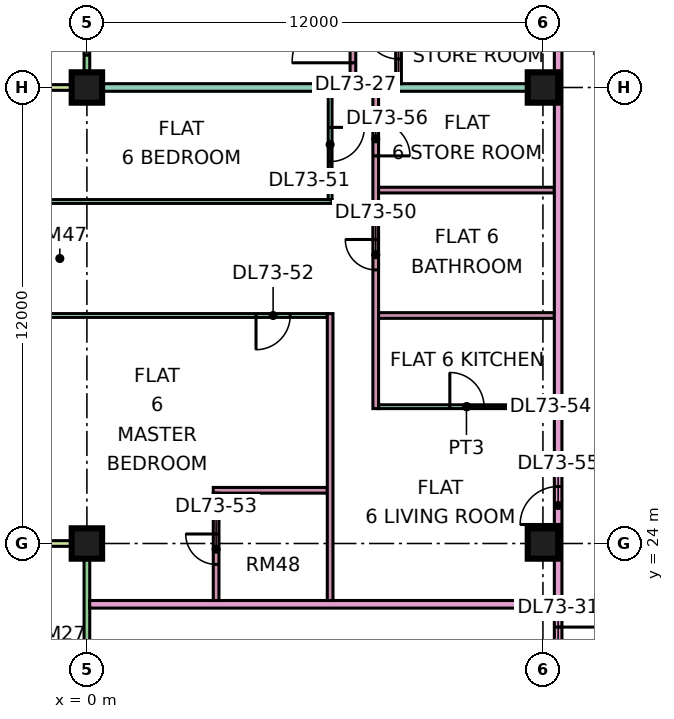
"""IFC4 building model, lengths in metres.
Left out: names, types, materials, properties, quantities, classifications, styles, units other than length and angle.
Written with IfcOpenShell. Run it as: python <this file> out.ifc"""

import sys

from ifc_helpers import new_model, si_unit, direction, frame, frame_2d, origin, origin_2d, place, context, subcontext, project, spatial, rectangle, extrude, element, fill, save


model = new_model("IFC4")
c1 = context("Model", 3, precision=1e-05, world=origin(), true_north=direction((0.0, 1.0)))
c2 = subcontext(c1, "Body", "Model", "MODEL_VIEW")
j1 = project(units=[si_unit("LENGTHUNIT", "METRE"), si_unit("PLANEANGLEUNIT", "RADIAN")], contexts=[c1])
p1 = place(None, origin())
s1 = spatial("IfcSite", under=j1, at=p1, CompositionType="ELEMENT")
p2 = place(p1, origin())
s2 = spatial("IfcBuilding", under=s1, at=p2, CompositionType="ELEMENT")
p3 = place(p2, frame((0.0, 0.0, 310.9)))
s3 = spatial("IfcBuildingStorey", under=s2, at=p3, CompositionType="ELEMENT", Elevation=310.9)
p4 = place(p3, frame((0.0, 24.0, 0.0), z_axis=(0.0, 0.0, 1.0), x_axis=(1.0, 0.0, 0.0)))
e1 = element("IfcColumn", 1, at=p4, inside=s3, PredefinedType="COLUMN", context=c2, shape_type="SweptSolid", body=[
    extrude(rectangle(XDim=0.8, YDim=0.8, at=origin_2d()), origin(), (0.0, 0.0, 1.0), 3.75),
])
p5 = place(p3, frame((0.0, 36.0, 0.0), z_axis=(0.0, 0.0, 1.0), x_axis=(1.0, 0.0, 0.0)))
e2 = element("IfcColumn", 2, at=p5, inside=s3, PredefinedType="COLUMN", context=c2, shape_type="SweptSolid", body=[
    extrude(rectangle(XDim=0.8, YDim=0.8, at=origin_2d()), origin(), (0.0, 0.0, 1.0), 3.75),
])
for number, where, z_axis, x_axis in (
    (3, (12.0, 24.0, 0.0), (0.0, 0.0, 1.0), (1.0, 0.0, 0.0)),
    (4, (12.0, 36.0, 0.0), (0.0, 0.0, 1.0), (1.0, 0.0, 0.0)),
):
    element("IfcColumn", number, at=place(p3, frame(where, z_axis=z_axis, x_axis=x_axis)), inside=s3, PredefinedType="COLUMN", context=c2, shape_type="SweptSolid", body=[
        extrude(rectangle(XDim=0.8, YDim=0.8, at=origin_2d()), origin(), (0.0, 0.0, 1.0), 3.75),
    ])
p6 = place(p3, frame((0.0, 47.925, 0.0), z_axis=(0.0, 0.0, 1.0), x_axis=(0.0, -1.0, 0.0)))
e5 = element("IfcWall", 5, at=p6, inside=s3, PredefinedType="SOLIDWALL", context=c2, shape_type="SweptSolid", body=[
    extrude(rectangle(XDim=11.85, YDim=0.15, at=frame_2d((5.925, 0.0))), origin(), (0.0, 0.0, 1.0), 3.35),
])
p7 = place(p6, frame((0.613, 0.0, 0.0)))
e6 = element("IfcOpeningElement", 6, at=p7, cuts=e5, PredefinedType="OPENING", context=c2, shape_type="SweptSolid", body=[
    extrude(rectangle(XDim=1.2, YDim=2.4, at=frame_2d((0.6, 1.2))), frame((0.0, 0.085, 0.0), z_axis=(0.0, -1.0, 0.0), x_axis=(1.0, 0.0, 0.0)), (0.0, 0.0, 1.0), 0.17),
])
p8 = place(p6, frame((4.675, 0.0, 0.45)))
e7 = element("IfcOpeningElement", 7, at=p8, cuts=e5, PredefinedType="OPENING", context=c2, shape_type="SweptSolid", body=[
    extrude(rectangle(XDim=3.0, YDim=2.4, at=frame_2d((1.5, 1.2))), frame((0.0, 0.085, 0.0), z_axis=(0.0, -1.0, 0.0), x_axis=(1.0, 0.0, 0.0)), (0.0, 0.0, 1.0), 0.17),
])
p9 = place(p6, frame((9.275, 0.0, 0.45)))
e8 = element("IfcOpeningElement", 8, at=p9, cuts=e5, PredefinedType="OPENING", context=c2, shape_type="SweptSolid", body=[
    extrude(rectangle(XDim=1.8, YDim=2.4, at=frame_2d((0.9, 1.2))), frame((0.0, 0.085, 0.0), z_axis=(0.0, -1.0, 0.0), x_axis=(1.0, 0.0, 0.0)), (0.0, 0.0, 1.0), 0.17),
])
p10 = place(p3, frame((-1.5, 36.0, 0.0), z_axis=(0.0, 0.0, 1.0), x_axis=(1.0, 0.0, 0.0)))
e9 = element("IfcWall", 9, at=p10, inside=s3, PredefinedType="SOLIDWALL", context=c2, shape_type="SweptSolid", body=[
    extrude(rectangle(XDim=1.5, YDim=0.15, at=frame_2d((0.75, 0.0))), origin(), (0.0, 0.0, 1.0), 3.35),
])
p11 = place(p3, frame((0.0, 23.925, 0.0), z_axis=(0.0, 0.0, 1.0), x_axis=(0.0, -1.0, 0.0)))
e10 = element("IfcWall", 10, at=p11, inside=s3, PredefinedType="SOLIDWALL", context=c2, shape_type="SweptSolid", body=[
    extrude(rectangle(XDim=11.35, YDim=0.15, at=frame_2d((5.675, 0.0))), origin(), (0.0, 0.0, 1.0), 3.35),
])
p12 = place(p11, frame((6.738, 0.0, 0.0)))
e11 = element("IfcOpeningElement", 11, at=p12, cuts=e10, PredefinedType="OPENING", context=c2, shape_type="SweptSolid", body=[
    extrude(rectangle(XDim=1.8, YDim=2.4, at=frame_2d((0.9, 1.2))), frame((0.0, 0.085, 0.0), z_axis=(0.0, -1.0, 0.0), x_axis=(1.0, 0.0, 0.0)), (0.0, 0.0, 1.0), 0.17),
])
p13 = place(p3, frame((-1.5, 24.0, 0.0), z_axis=(0.0, 0.0, 1.0), x_axis=(1.0, 0.0, 0.0)))
e12 = element("IfcWall", 12, at=p13, inside=s3, PredefinedType="SOLIDWALL", context=c2, shape_type="SweptSolid", body=[
    extrude(rectangle(XDim=1.5, YDim=0.15, at=frame_2d((0.75, 0.0))), origin(), (0.0, 0.0, 1.0), 3.35),
])
p14 = place(p3, frame((-1.35, 30.0, 0.0), z_axis=(0.0, 0.0, 1.0), x_axis=(1.0, 0.0, 0.0)))
e13 = element("IfcWall", 13, at=p14, inside=s3, PredefinedType="PARTITIONING", context=c2, shape_type="SweptSolid", body=[
    extrude(rectangle(XDim=7.675, YDim=0.1, at=frame_2d((3.837, 0.0))), origin(), (0.0, 0.0, 1.0), 3.35),
])
p15 = place(p14, frame((5.8, 0.0, 0.0)))
e14 = element("IfcOpeningElement", 14, at=p15, cuts=e13, PredefinedType="OPENING", context=c2, shape_type="SweptSolid", body=[
    extrude(rectangle(XDim=0.9, YDim=2.1, at=frame_2d((0.45, 1.05))), frame((0.0, 0.06, 0.0), z_axis=(0.0, -1.0, 0.0), x_axis=(1.0, 0.0, 0.0)), (0.0, 0.0, 1.0), 0.12),
])
p16 = place(p3, frame((-1.35, 33.0, 0.0), z_axis=(0.0, 0.0, 1.0), x_axis=(1.0, 0.0, 0.0)))
e15 = element("IfcWall", 15, at=p16, inside=s3, PredefinedType="PARTITIONING", context=c2, shape_type="SweptSolid", body=[
    extrude(rectangle(XDim=7.8, YDim=0.1, at=frame_2d((3.9, 0.0))), origin(), (0.0, 0.0, 1.0), 3.35),
])
e16 = element("IfcWall", 16, at=p5, inside=s3, PredefinedType="PARTITIONING", context=c2, shape_type="SweptSolid", body=[
    extrude(rectangle(XDim=12.3, YDim=0.2, at=frame_2d((6.15, 0.0))), origin(), (0.0, 0.0, 1.0), 3.35),
])
p17 = place(p3, frame((0.074, 22.4, 0.0), z_axis=(0.0, 0.0, 1.0), x_axis=(1.0, 0.0, 0.0)))
e17 = element("IfcWall", 17, at=p17, inside=s3, PredefinedType="PARTITIONING", context=c2, shape_type="SweptSolid", body=[
    extrude(rectangle(XDim=12.226, YDim=0.2, at=frame_2d((6.113, 0.0))), origin(), (0.0, 0.0, 1.0), 3.35),
])
p18 = place(p3, frame((3.325, 25.4, 0.0), z_axis=(0.0, 0.0, 1.0), x_axis=(1.0, 0.0, 0.0)))
e18 = element("IfcWall", 18, at=p18, inside=s3, PredefinedType="PARTITIONING", context=c2, shape_type="SweptSolid", body=[
    extrude(rectangle(XDim=3.0, YDim=0.15, at=frame_2d((1.5, 0.0))), origin(), (0.0, 0.0, 1.0), 3.35),
])
p19 = place(p3, frame((3.4, 22.5, 0.0), z_axis=(0.0, 0.0, 1.0), x_axis=(0.0, 1.0, 0.0)))
e19 = element("IfcWall", 19, at=p19, inside=s3, PredefinedType="PARTITIONING", context=c2, shape_type="SweptSolid", body=[
    extrude(rectangle(XDim=2.825, YDim=0.15, at=frame_2d((1.413, 0.0))), origin(), (0.0, 0.0, 1.0), 3.35),
])
p20 = place(p19, frame((0.95, 0.0, 0.0)))
e20 = element("IfcOpeningElement", 20, at=p20, cuts=e19, PredefinedType="OPENING", context=c2, shape_type="SweptSolid", body=[
    extrude(rectangle(XDim=0.8, YDim=2.1, at=frame_2d((0.4, 1.05))), frame((0.0, 0.085, 0.0), z_axis=(0.0, -1.0, 0.0), x_axis=(1.0, 0.0, 0.0)), (0.0, 0.0, 1.0), 0.17),
])
p21 = place(p3, frame((6.4, 22.5, 0.0), z_axis=(0.0, 0.0, 1.0), x_axis=(0.0, 1.0, 0.0)))
e21 = element("IfcWall", 21, at=p21, inside=s3, PredefinedType="PARTITIONING", context=c2, shape_type="SweptSolid", body=[
    extrude(rectangle(XDim=7.55, YDim=0.15, at=frame_2d((3.775, 0.0))), origin(), (0.0, 0.0, 1.0), 3.35),
])
p22 = place(p3, frame((6.4, 33.05, 0.0), z_axis=(0.0, 0.0, 1.0), x_axis=(0.0, 1.0, 0.0)))
e22 = element("IfcWall", 22, at=p22, inside=s3, PredefinedType="PARTITIONING", context=c2, shape_type="SweptSolid", body=[
    extrude(rectangle(XDim=2.85, YDim=0.1, at=frame_2d((1.425, 0.0))), origin(), (0.0, 0.0, 1.0), 3.35),
])
p23 = place(p22, frame((1.0, 0.0, 0.0)))
e23 = element("IfcOpeningElement", 23, at=p23, cuts=e22, PredefinedType="OPENING", context=c2, shape_type="SweptSolid", body=[
    extrude(rectangle(XDim=0.9, YDim=2.1, at=frame_2d((0.45, 1.05))), frame((0.0, 0.06, 0.0), z_axis=(0.0, -1.0, 0.0), x_axis=(1.0, 0.0, 0.0)), (0.0, 0.0, 1.0), 0.12),
])
p24 = place(p3, frame((7.0, 36.1, 0.0), z_axis=(0.0, 0.0, 1.0), x_axis=(0.0, 1.0, 0.0)))
e24 = element("IfcWall", 24, at=p24, inside=s3, PredefinedType="PARTITIONING", context=c2, shape_type="SweptSolid", body=[
    extrude(rectangle(XDim=8.95, YDim=0.15, at=frame_2d((4.475, 0.0))), origin(), (0.0, 0.0, 1.0), 3.35),
])
p25 = place(p24, frame((6.95, 0.0, 0.0)))
e25 = element("IfcOpeningElement", 25, at=p25, cuts=e24, PredefinedType="OPENING", context=c2, shape_type="SweptSolid", body=[
    extrude(rectangle(XDim=0.9, YDim=2.1, at=frame_2d((0.45, 1.05))), frame((0.0, 0.085, 0.0), z_axis=(0.0, -1.0, 0.0), x_axis=(1.0, 0.0, 0.0)), (0.0, 0.0, 1.0), 0.17),
])
p26 = place(p24, frame((0.55, 0.0, 0.0)))
e26 = element("IfcOpeningElement", 26, at=p26, cuts=e24, PredefinedType="OPENING", context=c2, shape_type="SweptSolid", body=[
    extrude(rectangle(XDim=1.6, YDim=2.1, at=frame_2d((0.8, 1.05))), frame((0.0, 0.085, 0.0), z_axis=(0.0, -1.0, 0.0), x_axis=(1.0, 0.0, 0.0)), (0.0, 0.0, 1.0), 0.17),
])
p27 = place(p3, frame((7.6, 27.55, 0.0), z_axis=(0.0, 0.0, 1.0), x_axis=(0.0, 1.0, 0.0)))
e27 = element("IfcWall", 27, at=p27, inside=s3, PredefinedType="PARTITIONING", context=c2, shape_type="SweptSolid", body=[
    extrude(rectangle(XDim=8.35, YDim=0.15, at=frame_2d((4.175, 0.0))), origin(), (0.0, 0.0, 1.0), 3.35),
])
p28 = place(p27, frame((3.65, 0.0, 0.0)))
e28 = element("IfcOpeningElement", 28, at=p28, cuts=e27, PredefinedType="OPENING", context=c2, shape_type="SweptSolid", body=[
    extrude(rectangle(XDim=0.8, YDim=2.1, at=frame_2d((0.4, 1.05))), frame((0.0, 0.085, 0.0), z_axis=(0.0, -1.0, 0.0), x_axis=(1.0, 0.0, 0.0)), (0.0, 0.0, 1.0), 0.17),
])
p29 = place(p27, frame((6.65, 0.0, 0.0)))
e29 = element("IfcOpeningElement", 29, at=p29, cuts=e27, PredefinedType="OPENING", context=c2, shape_type="SweptSolid", body=[
    extrude(rectangle(XDim=0.9, YDim=2.1, at=frame_2d((0.45, 1.05))), frame((0.0, 0.085, 0.0), z_axis=(0.0, -1.0, 0.0), x_axis=(1.0, 0.0, 0.0)), (0.0, 0.0, 1.0), 0.17),
])
p30 = place(p3, frame((7.675, 27.6, 0.0), z_axis=(0.0, 0.0, 1.0), x_axis=(1.0, 0.0, 0.0)))
e30 = element("IfcWall", 30, at=p30, inside=s3, PredefinedType="PARTITIONING", context=c2, shape_type="SweptSolid", body=[
    extrude(rectangle(XDim=4.625, YDim=0.1, at=frame_2d((2.312, 0.0))), origin(), (0.0, 0.0, 1.0), 3.35),
])
p31 = place(p30, frame((1.875, 0.0, 0.0)))
e31 = element("IfcOpeningElement", 31, at=p31, cuts=e30, PredefinedType="OPENING", context=c2, shape_type="SweptSolid", body=[
    extrude(rectangle(XDim=0.9, YDim=2.1, at=frame_2d((0.45, 1.05))), frame((0.0, 0.06, 0.0), z_axis=(0.0, -1.0, 0.0), x_axis=(1.0, 0.0, 0.0)), (0.0, 0.0, 1.0), 0.12),
])
for number, where, z_axis, x_axis in (
    (32, (7.675, 30.0, 0.0), (0.0, 0.0, 1.0), (1.0, 0.0, 0.0)),
    (33, (7.675, 33.3, 0.0), (0.0, 0.0, 1.0), (1.0, 0.0, 0.0)),
):
    element("IfcWall", number, at=place(p3, frame(where, z_axis=z_axis, x_axis=x_axis)), inside=s3, PredefinedType="PARTITIONING", context=c2, shape_type="SweptSolid", body=[
        extrude(rectangle(XDim=4.625, YDim=0.15, at=frame_2d((2.312, 0.0))), origin(), (0.0, 0.0, 1.0), 3.35),
    ])
p32 = place(p3, frame((8.2, 36.1, 0.0), z_axis=(0.0, 0.0, 1.0), x_axis=(0.0, 1.0, 0.0)))
e34 = element("IfcWall", 34, at=p32, inside=s3, PredefinedType="PARTITIONING", context=c2, shape_type="SweptSolid", body=[
    extrude(rectangle(XDim=14.65, YDim=0.15, at=frame_2d((7.325, 0.0))), origin(), (0.0, 0.0, 1.0), 3.35),
])
p33 = place(p32, frame((9.65, 0.0, 0.0)))
e35 = element("IfcOpeningElement", 35, at=p33, cuts=e34, PredefinedType="OPENING", context=c2, shape_type="SweptSolid", body=[
    extrude(rectangle(XDim=0.8, YDim=2.1, at=frame_2d((0.4, 1.05))), frame((0.0, 0.085, 0.0), z_axis=(0.0, -1.0, 0.0), x_axis=(1.0, 0.0, 0.0)), (0.0, 0.0, 1.0), 0.17),
])
p34 = place(p32, frame((5.15, 0.0, 0.0)))
e36 = element("IfcOpeningElement", 36, at=p34, cuts=e34, PredefinedType="OPENING", context=c2, shape_type="SweptSolid", body=[
    extrude(rectangle(XDim=0.9, YDim=2.1, at=frame_2d((0.45, 1.05))), frame((0.0, 0.085, 0.0), z_axis=(0.0, -1.0, 0.0), x_axis=(1.0, 0.0, 0.0)), (0.0, 0.0, 1.0), 0.17),
])
p35 = place(p32, frame((0.65, 0.0, 0.0)))
e37 = element("IfcOpeningElement", 37, at=p35, cuts=e34, PredefinedType="OPENING", context=c2, shape_type="SweptSolid", body=[
    extrude(rectangle(XDim=0.9, YDim=2.1, at=frame_2d((0.45, 1.05))), frame((0.0, 0.085, 0.0), z_axis=(0.0, -1.0, 0.0), x_axis=(1.0, 0.0, 0.0)), (0.0, 0.0, 1.0), 0.17),
])
p36 = place(p3, frame((12.4, 20.0, 0.0), z_axis=(0.0, 0.0, 1.0), x_axis=(0.0, 1.0, 0.0)))
e38 = element("IfcWall", 38, at=p36, inside=s3, PredefinedType="PARTITIONING", context=c2, shape_type="SweptSolid", body=[
    extrude(rectangle(XDim=33.926, YDim=0.2, at=frame_2d((16.963, 0.0))), origin(), (0.0, 0.0, 1.0), 3.35),
])
p37 = place(p36, frame((31.8, 0.0, 0.0)))
e39 = element("IfcOpeningElement", 39, at=p37, cuts=e38, PredefinedType="OPENING", context=c2, shape_type="SweptSolid", body=[
    extrude(rectangle(XDim=1.0, YDim=2.1, at=frame_2d((0.5, 1.05))), frame((0.0, 0.11, 0.0), z_axis=(0.0, -1.0, 0.0), x_axis=(1.0, 0.0, 0.0)), (0.0, 0.0, 1.0), 0.22),
])
p38 = place(p36, frame((0.6, 0.0, 0.0)))
e40 = element("IfcOpeningElement", 40, at=p38, cuts=e38, PredefinedType="OPENING", context=c2, shape_type="SweptSolid", body=[
    extrude(rectangle(XDim=1.2, YDim=2.1, at=frame_2d((0.6, 1.05))), frame((0.0, 0.11, 0.0), z_axis=(0.0, -1.0, 0.0), x_axis=(1.0, 0.0, 0.0)), (0.0, 0.0, 1.0), 0.22),
])
p39 = place(p36, frame((4.5, 0.0, 0.0)))
e41 = element("IfcOpeningElement", 41, at=p39, cuts=e38, PredefinedType="OPENING", context=c2, shape_type="SweptSolid", body=[
    extrude(rectangle(XDim=1.0, YDim=2.1, at=frame_2d((0.5, 1.05))), frame((0.0, 0.11, 0.0), z_axis=(0.0, -1.0, 0.0), x_axis=(1.0, 0.0, 0.0)), (0.0, 0.0, 1.0), 0.22),
])
p40 = place(p9, origin())
e42 = element("IfcWindow", 42, at=p40, inside=s3, PartitioningType="SINGLE_PANEL", PredefinedType="WINDOW", context=c2, shape_type="SweptSolid", body=[
    extrude(rectangle(XDim=1.8, YDim=2.4, at=frame_2d((0.9, 1.2))), frame((0.0, 0.03, 0.0), z_axis=(0.0, -1.0, 0.0), x_axis=(1.0, 0.0, 0.0)), (0.0, 0.0, 1.0), 0.06),
])
fill(e8, e42)
p41 = place(p26, origin())
e43 = element("IfcDoor", 43, at=p41, inside=s3, OperationType="DOUBLE_DOOR_SINGLE_SWING", PredefinedType="DOOR", context=c2, shape_type="SweptSolid", body=[
    extrude(rectangle(XDim=1.6, YDim=2.1, at=frame_2d((0.8, 1.05))), frame((0.0, 0.025, 0.0), z_axis=(0.0, -1.0, 0.0), x_axis=(1.0, 0.0, 0.0)), (0.0, 0.0, 1.0), 0.05),
])
fill(e26, e43)
p42 = place(p35, frame((0.9, 0.0, 0.0), z_axis=(0.0, 0.0, 1.0), x_axis=(-1.0, 0.0, 0.0)))
e44 = element("IfcDoor", 44, at=p42, inside=s3, OperationType="SINGLE_SWING_RIGHT", PredefinedType="DOOR", context=c2, shape_type="SweptSolid", body=[
    extrude(rectangle(XDim=0.9, YDim=2.1, at=frame_2d((0.45, 1.05))), frame((0.0, 0.025, 0.0), z_axis=(0.0, -1.0, 0.0), x_axis=(1.0, 0.0, 0.0)), (0.0, 0.0, 1.0), 0.05),
])
fill(e37, e44)
p43 = place(p38, origin())
e45 = element("IfcDoor", 45, at=p43, inside=s3, OperationType="SINGLE_SWING_RIGHT", PredefinedType="DOOR", context=c2, shape_type="SweptSolid", body=[
    extrude(rectangle(XDim=1.2, YDim=2.1, at=frame_2d((0.6, 1.05))), frame((0.0, 0.025, 0.0), z_axis=(0.0, -1.0, 0.0), x_axis=(1.0, 0.0, 0.0)), (0.0, 0.0, 1.0), 0.05),
])
fill(e40, e45)
p44 = place(p28, frame((0.8, 0.0, 0.0), z_axis=(0.0, 0.0, 1.0), x_axis=(-1.0, 0.0, 0.0)))
e46 = element("IfcDoor", 46, at=p44, inside=s3, OperationType="SINGLE_SWING_RIGHT", PredefinedType="DOOR", context=c2, shape_type="SweptSolid", body=[
    extrude(rectangle(XDim=0.8, YDim=2.1, at=frame_2d((0.4, 1.05))), frame((0.0, 0.025, 0.0), z_axis=(0.0, -1.0, 0.0), x_axis=(1.0, 0.0, 0.0)), (0.0, 0.0, 1.0), 0.05),
])
fill(e28, e46)
p45 = place(p23, origin())
e47 = element("IfcDoor", 47, at=p45, inside=s3, OperationType="SINGLE_SWING_RIGHT", PredefinedType="DOOR", context=c2, shape_type="SweptSolid", body=[
    extrude(rectangle(XDim=0.9, YDim=2.1, at=frame_2d((0.45, 1.05))), frame((0.0, 0.025, 0.0), z_axis=(0.0, -1.0, 0.0), x_axis=(1.0, 0.0, 0.0)), (0.0, 0.0, 1.0), 0.05),
])
fill(e23, e47)
p46 = place(p15, frame((0.9, 0.0, 0.0), z_axis=(0.0, 0.0, 1.0), x_axis=(-1.0, 0.0, 0.0)))
e48 = element("IfcDoor", 48, at=p46, inside=s3, OperationType="SINGLE_SWING_LEFT", PredefinedType="DOOR", context=c2, shape_type="SweptSolid", body=[
    extrude(rectangle(XDim=0.9, YDim=2.1, at=frame_2d((0.45, 1.05))), frame((0.0, 0.025, 0.0), z_axis=(0.0, -1.0, 0.0), x_axis=(1.0, 0.0, 0.0)), (0.0, 0.0, 1.0), 0.05),
])
fill(e14, e48)
p47 = place(p20, frame((0.8, 0.0, 0.0), z_axis=(0.0, 0.0, 1.0), x_axis=(-1.0, 0.0, 0.0)))
e49 = element("IfcDoor", 49, at=p47, inside=s3, OperationType="SINGLE_SWING_RIGHT", PredefinedType="DOOR", context=c2, shape_type="SweptSolid", body=[
    extrude(rectangle(XDim=0.8, YDim=2.1, at=frame_2d((0.4, 1.05))), frame((0.0, 0.025, 0.0), z_axis=(0.0, -1.0, 0.0), x_axis=(1.0, 0.0, 0.0)), (0.0, 0.0, 1.0), 0.05),
])
fill(e20, e49)
p48 = place(p31, origin())
e50 = element("IfcDoor", 50, at=p48, inside=s3, OperationType="SINGLE_SWING_LEFT", PredefinedType="DOOR", context=c2, shape_type="SweptSolid", body=[
    extrude(rectangle(XDim=0.9, YDim=2.1, at=frame_2d((0.45, 1.05))), frame((0.0, 0.025, 0.0), z_axis=(0.0, -1.0, 0.0), x_axis=(1.0, 0.0, 0.0)), (0.0, 0.0, 1.0), 0.05),
])
fill(e31, e50)
p49 = place(p39, origin())
e51 = element("IfcDoor", 51, at=p49, inside=s3, OperationType="SINGLE_SWING_LEFT", PredefinedType="DOOR", context=c2, shape_type="SweptSolid", body=[
    extrude(rectangle(XDim=1.0, YDim=2.1, at=frame_2d((0.5, 1.05))), frame((0.0, 0.025, 0.0), z_axis=(0.0, -1.0, 0.0), x_axis=(1.0, 0.0, 0.0)), (0.0, 0.0, 1.0), 0.05),
])
fill(e41, e51)
p50 = place(p29, frame((0.9, 0.0, 0.0), z_axis=(0.0, 0.0, 1.0), x_axis=(-1.0, 0.0, 0.0)))
e52 = element("IfcDoor", 52, at=p50, inside=s3, OperationType="SINGLE_SWING_LEFT", PredefinedType="DOOR", context=c2, shape_type="SweptSolid", body=[
    extrude(rectangle(XDim=0.9, YDim=2.1, at=frame_2d((0.45, 1.05))), frame((0.0, 0.025, 0.0), z_axis=(0.0, -1.0, 0.0), x_axis=(1.0, 0.0, 0.0)), (0.0, 0.0, 1.0), 0.05),
])
fill(e29, e52)
save(model, sys.argv[1])
